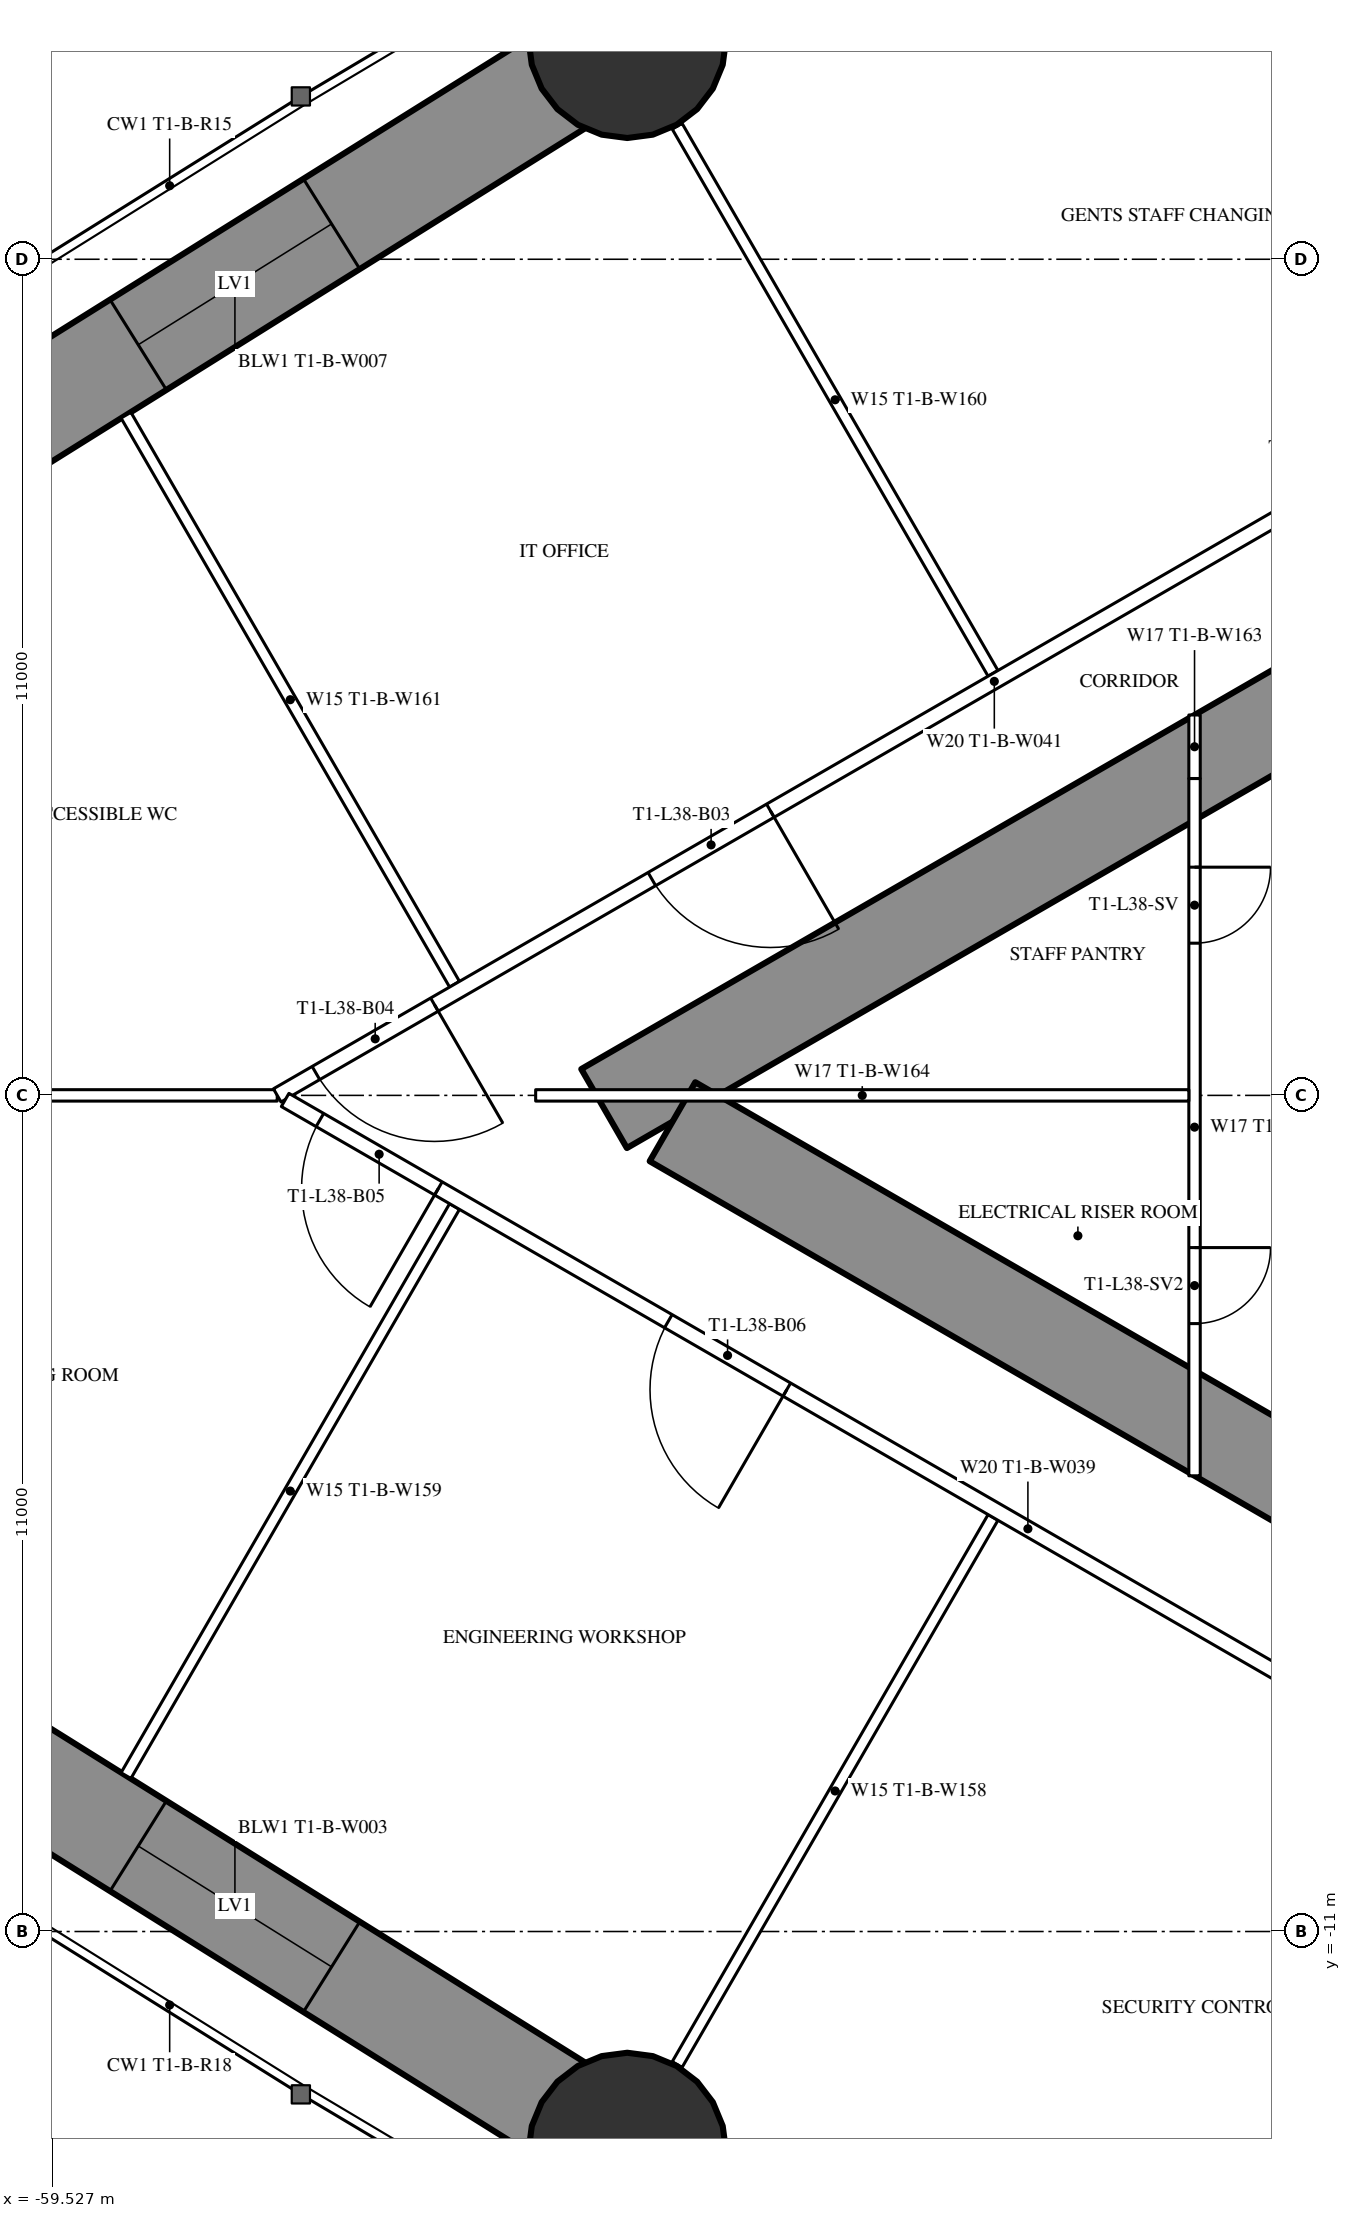
"""IFC4 building model, lengths in metres.
Left out: names, types, materials, properties, quantities, classifications, styles, units other than length and angle.
Written with IfcOpenShell. Run it as: python <this file> out.ifc"""

import sys

from ifc_helpers import new_model, si_unit, direction, frame, frame_2d, origin, origin_2d, place, context, subcontext, project, spatial, rectangle, hollow_circle, extrude, element, fill, save


model = new_model("IFC4")
c1 = context("Model", 3, precision=1e-05, world=origin(), true_north=direction((0.0, 1.0)))
c2 = subcontext(c1, "Body", "Model", "MODEL_VIEW")
j1 = project(units=[si_unit("LENGTHUNIT", "METRE"), si_unit("PLANEANGLEUNIT", "RADIAN")], contexts=[c1])
p1 = place(None, origin())
s1 = spatial("IfcSite", under=j1, at=p1, CompositionType="ELEMENT")
p2 = place(p1, origin())
s2 = spatial("IfcBuilding", under=s1, at=p2, CompositionType="ELEMENT")
p3 = place(p2, frame((0.0, 0.0, 143.1)))
s3 = spatial("IfcBuildingStorey", under=s2, at=p3, CompositionType="ELEMENT", Elevation=143.1)
for number, where, z_axis, x_axis in (
    (1, (-51.963, -13.895, 0.0), (0.0, 0.0, 1.0), (1.0, 0.0, 0.0)),
    (2, (-51.963, 13.895, 0.0), (0.0, 0.0, 1.0), (1.0, 0.0, 0.0)),
):
    element("IfcColumn", number, at=place(p3, frame(where, z_axis=z_axis, x_axis=x_axis)), inside=s3, PredefinedType="COLUMN", context=c2, shape_type="SweptSolid", body=[
        extrude(hollow_circle(Radius=1.3, WallThickness=0.1, at=origin_2d()), origin(), (0.0, 0.0, 1.0), 3.6),
    ])
p4 = place(p3, frame((-27.2, 14.3, 0.0), z_axis=(0.0, 0.0, 1.0), x_axis=(-0.866026593062, -0.499997940104, 0.0)))
e3 = element("IfcWall", 3, at=p4, inside=s3, PredefinedType="SHEAR", context=c2, shape_type="SweptSolid", body=[
    extrude(rectangle(XDim=28.946, YDim=1.2, at=frame_2d((14.473, 0.0))), origin(), (0.0, 0.0, 1.0), 3.6),
])
p5 = place(p4, frame((4.6, 0.0, 0.0)))
e4 = element("IfcOpeningElement", 4, at=p5, cuts=e3, PredefinedType="OPENING", context=c2, shape_type="SweptSolid", body=[
    extrude(rectangle(XDim=1.0, YDim=2.2, at=frame_2d((0.5, 1.1))), frame((0.0, 0.61, 0.0), z_axis=(0.0, -1.0, 0.0), x_axis=(1.0, 0.0, 0.0)), (0.0, 0.0, 1.0), 1.22),
])
p6 = place(p4, frame((14.545, 0.0, 0.0)))
e5 = element("IfcOpeningElement", 5, at=p6, cuts=e3, PredefinedType="OPENING", context=c2, shape_type="SweptSolid", body=[
    extrude(rectangle(XDim=1.8, YDim=2.2, at=frame_2d((0.9, 1.1))), frame((0.0, 0.61, 0.0), z_axis=(0.0, -1.0, 0.0), x_axis=(1.0, 0.0, 0.0)), (0.0, 0.0, 1.0), 1.22),
])
p7 = place(p3, frame((-27.2, -14.3, 0.0), z_axis=(0.0, 0.0, 1.0), x_axis=(-0.866024021859, 0.500002393557, 0.0)))
e6 = element("IfcWall", 6, at=p7, inside=s3, PredefinedType="SHEAR", context=c2, shape_type="SweptSolid", body=[
    extrude(rectangle(XDim=27.907, YDim=1.2, at=frame_2d((13.954, 0.0))), origin(), (0.0, 0.0, 1.0), 3.6),
])
p8 = place(p7, frame((4.6, 0.0, 0.0)))
e7 = element("IfcOpeningElement", 7, at=p8, cuts=e6, PredefinedType="OPENING", context=c2, shape_type="SweptSolid", body=[
    extrude(rectangle(XDim=1.0, YDim=2.2, at=frame_2d((0.5, 1.1))), frame((0.0, 0.61, 0.0), z_axis=(0.0, -1.0, 0.0), x_axis=(1.0, 0.0, 0.0)), (0.0, 0.0, 1.0), 1.22),
])
p9 = place(p7, frame((13.845, 0.0, 0.0)))
e8 = element("IfcOpeningElement", 8, at=p9, cuts=e6, PredefinedType="OPENING", context=c2, shape_type="SweptSolid", body=[
    extrude(rectangle(XDim=1.8, YDim=2.2, at=frame_2d((0.9, 1.1))), frame((0.0, 0.61, 0.0), z_axis=(0.0, -1.0, 0.0), x_axis=(1.0, 0.0, 0.0)), (0.0, 0.0, 1.0), 1.22),
])
p10 = place(p3, frame((-41.245, 19.666, 0.0), z_axis=(0.0, 0.0, 1.0), x_axis=(-0.880492350889, -0.474060354835, 0.0)))
e9 = element("IfcWall", 9, at=p10, inside=s3, PredefinedType="SHEAR", context=c2, shape_type="SweptSolid", body=[
    extrude(rectangle(XDim=12.173, YDim=1.4, at=frame_2d((6.086, 0.0))), origin(), (0.0, 0.0, 1.0), 3.6),
])
p11 = place(p10, frame((4.586, 0.0, 0.6)))
e10 = element("IfcOpeningElement", 10, at=p11, cuts=e9, PredefinedType="OPENING", context=c2, shape_type="SweptSolid", body=[
    extrude(rectangle(XDim=3.0, YDim=1.2, at=frame_2d((1.5, 0.6))), frame((0.0, 0.71, 0.0), z_axis=(0.0, -1.0, 0.0), x_axis=(1.0, 0.0, 0.0)), (0.0, 0.0, 1.0), 1.42),
])
p12 = place(p3, frame((-51.963, 13.895, 0.0), z_axis=(0.0, 0.0, 1.0), x_axis=(-0.848062521637, -0.529896177939, 0.0)))
e11 = element("IfcWall", 11, at=p12, inside=s3, PredefinedType="SHEAR", context=c2, shape_type="SweptSolid", body=[
    extrude(rectangle(XDim=12.173, YDim=1.4, at=frame_2d((6.086, 0.0))), origin(), (0.0, 0.0, 1.0), 3.6),
])
p13 = place(p12, frame((4.586, 0.0, 0.6)))
e12 = element("IfcOpeningElement", 12, at=p13, cuts=e11, PredefinedType="OPENING", context=c2, shape_type="SweptSolid", body=[
    extrude(rectangle(XDim=3.0, YDim=1.2, at=frame_2d((1.5, 0.6))), frame((0.0, 0.71, 0.0), z_axis=(0.0, -1.0, 0.0), x_axis=(1.0, 0.0, 0.0)), (0.0, 0.0, 1.0), 1.42),
])
p14 = place(p3, frame((-62.287, -7.445, 0.0), z_axis=(0.0, 0.0, 1.0), x_axis=(0.848062521637, -0.529896177939, 0.0)))
e13 = element("IfcWall", 13, at=p14, inside=s3, PredefinedType="SHEAR", context=c2, shape_type="SweptSolid", body=[
    extrude(rectangle(XDim=12.173, YDim=1.4, at=frame_2d((6.086, 0.0))), origin(), (0.0, 0.0, 1.0), 3.6),
])
p15 = place(p14, frame((4.586, 0.0, 0.6)))
e14 = element("IfcOpeningElement", 14, at=p15, cuts=e13, PredefinedType="OPENING", context=c2, shape_type="SweptSolid", body=[
    extrude(rectangle(XDim=3.0, YDim=1.2, at=frame_2d((1.5, 0.6))), frame((0.0, 0.71, 0.0), z_axis=(0.0, -1.0, 0.0), x_axis=(1.0, 0.0, 0.0)), (0.0, 0.0, 1.0), 1.42),
])
p16 = place(p3, frame((-51.963, -13.895, 0.0), z_axis=(0.0, 0.0, 1.0), x_axis=(0.880492350889, -0.474060354835, 0.0)))
e15 = element("IfcWall", 15, at=p16, inside=s3, PredefinedType="SHEAR", context=c2, shape_type="SweptSolid", body=[
    extrude(rectangle(XDim=12.173, YDim=1.4, at=frame_2d((6.086, 0.0))), origin(), (0.0, 0.0, 1.0), 3.6),
])
p17 = place(p16, frame((4.586, 0.0, 0.6)))
e16 = element("IfcOpeningElement", 16, at=p17, cuts=e15, PredefinedType="OPENING", context=c2, shape_type="SweptSolid", body=[
    extrude(rectangle(XDim=3.0, YDim=1.2, at=frame_2d((1.5, 0.6))), frame((0.0, 0.71, 0.0), z_axis=(0.0, -1.0, 0.0), x_axis=(1.0, 0.0, 0.0)), (0.0, 0.0, 1.0), 1.42),
])
p18 = place(p3, frame((-47.151, 5.552, 0.0), z_axis=(0.0, 0.0, 1.0), x_axis=(-0.500003012045, 0.866023664773, 0.0)))
e17 = element("IfcWall", 17, at=p18, inside=s3, PredefinedType="PARTITIONING", context=c2, shape_type="SweptSolid", body=[
    extrude(rectangle(XDim=8.311, YDim=0.15, at=frame_2d((4.156, 0.0))), origin(), (0.0, 0.0, 1.0), 2.15),
])
p19 = place(p3, frame((-54.236, 1.462, 0.0), z_axis=(0.0, 0.0, 1.0), x_axis=(-0.499999505331, 0.866025689381, 0.0)))
e18 = element("IfcWall", 18, at=p19, inside=s3, PredefinedType="PARTITIONING", context=c2, shape_type="SweptSolid", body=[
    extrude(rectangle(XDim=8.645, YDim=0.15, at=frame_2d((4.323, 0.0))), origin(), (0.0, 0.0, 1.0), 3.35),
])
p20 = place(p3, frame((-47.151, -5.552, 0.0), z_axis=(0.0, 0.0, 1.0), x_axis=(-0.500003012045, -0.866023664773, 0.0)))
e19 = element("IfcWall", 19, at=p20, inside=s3, PredefinedType="PARTITIONING", context=c2, shape_type="SweptSolid", body=[
    extrude(rectangle(XDim=8.311, YDim=0.15, at=frame_2d((4.156, 0.0))), origin(), (0.0, 0.0, 1.0), 2.15),
])
p21 = place(p3, frame((-54.236, -1.462, 0.0), z_axis=(0.0, 0.0, 1.0), x_axis=(-0.499999505331, -0.866025689381, 0.0)))
e20 = element("IfcWall", 20, at=p21, inside=s3, PredefinedType="PARTITIONING", context=c2, shape_type="SweptSolid", body=[
    extrude(rectangle(XDim=8.645, YDim=0.15, at=frame_2d((4.323, 0.0))), origin(), (0.0, 0.0, 1.0), 3.35),
])
p22 = place(p3, frame((-56.568, 0.0, 0.0), z_axis=(0.0, 0.0, 1.0), x_axis=(-1.0, 0.0, 0.0)))
e21 = element("IfcWall", 21, at=p22, inside=s3, PredefinedType="PARTITIONING", context=c2, shape_type="SweptSolid", body=[
    extrude(rectangle(XDim=11.663, YDim=0.15, at=frame_2d((5.832, 0.0))), origin(), (0.0, 0.0, 1.0), 2.15),
])
p23 = place(p3, frame((-37.7, 10.894, 0.0), z_axis=(0.0, 0.0, 1.0), x_axis=(-0.866027905338, -0.499995667157, 0.0)))
e22 = element("IfcWall", 22, at=p23, inside=s3, PredefinedType="PARTITIONING", context=c2, shape_type="SweptSolid", body=[
    extrude(rectangle(XDim=21.787, YDim=0.2, at=frame_2d((10.894, 0.0))), origin(), (0.0, 0.0, 1.0), 3.35),
])
p24 = place(p23, frame((14.296, 0.0, 0.0)))
e23 = element("IfcOpeningElement", 23, at=p24, cuts=e22, PredefinedType="OPENING", context=c2, shape_type="SweptSolid", body=[
    extrude(rectangle(XDim=1.8, YDim=2.2, at=frame_2d((0.9, 1.1))), frame((0.0, 0.11, 0.0), z_axis=(0.0, -1.0, 0.0), x_axis=(1.0, 0.0, 0.0)), (0.0, 0.0, 1.0), 0.22),
])
p25 = place(p23, frame((19.399, 0.0, 0.0)))
e24 = element("IfcOpeningElement", 24, at=p25, cuts=e22, PredefinedType="OPENING", context=c2, shape_type="SweptSolid", body=[
    extrude(rectangle(XDim=1.8, YDim=2.14, at=frame_2d((0.9, 1.07))), frame((0.0, 0.11, 0.0), z_axis=(0.0, -1.0, 0.0), x_axis=(1.0, 0.0, 0.0)), (0.0, 0.0, 1.0), 0.22),
])
p26 = place(p23, frame((4.64, 0.0, 0.0)))
e25 = element("IfcOpeningElement", 25, at=p26, cuts=e22, PredefinedType="OPENING", context=c2, shape_type="SweptSolid", body=[
    extrude(rectangle(XDim=1.8, YDim=2.2, at=frame_2d((0.9, 1.1))), frame((0.0, 0.11, 0.0), z_axis=(0.0, -1.0, 0.0), x_axis=(1.0, 0.0, 0.0)), (0.0, 0.0, 1.0), 0.22),
])
p27 = place(p3, frame((-36.92, -11.344, 0.0), z_axis=(0.0, 0.0, 1.0), x_axis=(-0.866028313256, 0.499994960614, 0.0)))
e26 = element("IfcWall", 26, at=p27, inside=s3, PredefinedType="PARTITIONING", context=c2, shape_type="SweptSolid", body=[
    extrude(rectangle(XDim=22.568, YDim=0.2, at=frame_2d((11.284, 0.0))), origin(), (0.0, 0.0, 1.0), 3.35),
])
p28 = place(p27, frame((20.24, 0.0, 0.0)))
e27 = element("IfcOpeningElement", 27, at=p28, cuts=e26, PredefinedType="OPENING", context=c2, shape_type="SweptSolid", body=[
    extrude(rectangle(XDim=1.8, YDim=2.14, at=frame_2d((0.9, 1.07))), frame((0.0, 0.11, 0.0), z_axis=(0.0, -1.0, 0.0), x_axis=(1.0, 0.0, 0.0)), (0.0, 0.0, 1.0), 0.22),
])
p29 = place(p27, frame((14.946, 0.0, 0.0)))
e28 = element("IfcOpeningElement", 28, at=p29, cuts=e26, PredefinedType="OPENING", context=c2, shape_type="SweptSolid", body=[
    extrude(rectangle(XDim=1.8, YDim=2.2, at=frame_2d((0.9, 1.1))), frame((0.0, 0.11, 0.0), z_axis=(0.0, -1.0, 0.0), x_axis=(1.0, 0.0, 0.0)), (0.0, 0.0, 1.0), 0.22),
])
p30 = place(p27, frame((5.091, 0.0, 0.0)))
e29 = element("IfcOpeningElement", 29, at=p30, cuts=e26, PredefinedType="OPENING", context=c2, shape_type="SweptSolid", body=[
    extrude(rectangle(XDim=1.8, YDim=2.2, at=frame_2d((0.9, 1.1))), frame((0.0, 0.11, 0.0), z_axis=(0.0, -1.0, 0.0), x_axis=(1.0, 0.0, 0.0)), (0.0, 0.0, 1.0), 0.22),
])
p31 = place(p3, frame((-44.5, 4.169, 0.0), z_axis=(0.0, 0.0, 1.0), x_axis=(0.0, -1.0, 0.0)))
e30 = element("IfcWall", 30, at=p31, inside=s3, PredefinedType="PARTITIONING", context=c2, shape_type="SweptSolid", body=[
    extrude(rectangle(XDim=9.173, YDim=0.15, at=frame_2d((4.587, 0.0))), origin(), (0.0, 0.0, 1.0), 3.35),
])
p32 = place(p31, frame((1.167, 0.0, 0.0)))
e31 = element("IfcOpeningElement", 31, at=p32, cuts=e30, PredefinedType="OPENING", context=c2, shape_type="SweptSolid", body=[
    extrude(rectangle(XDim=1.0, YDim=2.2, at=frame_2d((0.5, 1.1))), frame((0.0, 0.085, 0.0), z_axis=(0.0, -1.0, 0.0), x_axis=(1.0, 0.0, 0.0)), (0.0, 0.0, 1.0), 0.17),
])
p33 = place(p31, frame((6.171, 0.0, 0.0)))
e32 = element("IfcOpeningElement", 32, at=p33, cuts=e30, PredefinedType="OPENING", context=c2, shape_type="SweptSolid", body=[
    extrude(rectangle(XDim=1.0, YDim=2.2, at=frame_2d((0.5, 1.1))), frame((0.0, 0.085, 0.0), z_axis=(0.0, -1.0, 0.0), x_axis=(1.0, 0.0, 0.0)), (0.0, 0.0, 1.0), 0.17),
])
p34 = place(p3, frame((-44.575, 0.0, 0.0), z_axis=(0.0, 0.0, 1.0), x_axis=(-1.0, 0.0, 0.0)))
e33 = element("IfcWall", 33, at=p34, inside=s3, PredefinedType="PARTITIONING", context=c2, shape_type="SweptSolid", body=[
    extrude(rectangle(XDim=8.593, YDim=0.15, at=frame_2d((4.297, 0.0))), origin(), (0.0, 0.0, 1.0), 2.15),
])
p35 = place(p3, frame((-44.5, 5.005, 0.0), z_axis=(0.0, 0.0, 1.0), x_axis=(0.0, -1.0, 0.0)))
e34 = element("IfcWall", 34, at=p35, inside=s3, PredefinedType="PARTITIONING", context=c2, shape_type="SweptSolid", body=[
    extrude(rectangle(XDim=0.836, YDim=0.15, at=frame_2d((0.418, 0.0))), origin(), (0.0, 0.0, 1.0), 2.15),
])
p36 = place(p13, origin())
e35 = element("IfcWindow", 35, at=p36, inside=s3, PartitioningType="SINGLE_PANEL", PredefinedType="WINDOW", context=c2, shape_type="SweptSolid", body=[
    extrude(rectangle(XDim=3.0, YDim=1.2, at=frame_2d((1.5, 0.6))), frame((0.0, 0.03, 0.0), z_axis=(0.0, -1.0, 0.0), x_axis=(1.0, 0.0, 0.0)), (0.0, 0.0, 1.0), 0.06),
])
fill(e12, e35)
p37 = place(p15, origin())
e36 = element("IfcWindow", 36, at=p37, inside=s3, PartitioningType="SINGLE_PANEL", PredefinedType="WINDOW", context=c2, shape_type="SweptSolid", body=[
    extrude(rectangle(XDim=3.0, YDim=1.2, at=frame_2d((1.5, 0.6))), frame((0.0, 0.03, 0.0), z_axis=(0.0, -1.0, 0.0), x_axis=(1.0, 0.0, 0.0)), (0.0, 0.0, 1.0), 0.06),
])
fill(e14, e36)
p38 = place(p24, origin())
e37 = element("IfcDoor", 37, at=p38, inside=s3, OperationType="DOUBLE_DOOR_SINGLE_SWING", PredefinedType="DOOR", context=c2, shape_type="SweptSolid", body=[
    extrude(rectangle(XDim=1.8, YDim=2.2, at=frame_2d((0.9, 1.1))), frame((0.0, 0.025, 0.0), z_axis=(0.0, -1.0, 0.0), x_axis=(1.0, 0.0, 0.0)), (0.0, 0.0, 1.0), 0.05),
])
fill(e23, e37)
p39 = place(p25, origin())
e38 = element("IfcDoor", 38, at=p39, inside=s3, OperationType="DOUBLE_DOOR_SINGLE_SWING", PredefinedType="DOOR", context=c2, shape_type="SweptSolid", body=[
    extrude(rectangle(XDim=1.8, YDim=2.14, at=frame_2d((0.9, 1.07))), frame((0.0, 0.025, 0.0), z_axis=(0.0, -1.0, 0.0), x_axis=(1.0, 0.0, 0.0)), (0.0, 0.0, 1.0), 0.05),
])
fill(e24, e38)
p40 = place(p28, origin())
e39 = element("IfcDoor", 39, at=p40, inside=s3, OperationType="DOUBLE_DOOR_SINGLE_SWING", PredefinedType="DOOR", context=c2, shape_type="SweptSolid", body=[
    extrude(rectangle(XDim=1.8, YDim=2.14, at=frame_2d((0.9, 1.07))), frame((0.0, 0.025, 0.0), z_axis=(0.0, -1.0, 0.0), x_axis=(1.0, 0.0, 0.0)), (0.0, 0.0, 1.0), 0.05),
])
fill(e27, e39)
p41 = place(p29, origin())
e40 = element("IfcDoor", 40, at=p41, inside=s3, OperationType="DOUBLE_DOOR_SINGLE_SWING", PredefinedType="DOOR", context=c2, shape_type="SweptSolid", body=[
    extrude(rectangle(XDim=1.8, YDim=2.2, at=frame_2d((0.9, 1.1))), frame((0.0, 0.025, 0.0), z_axis=(0.0, -1.0, 0.0), x_axis=(1.0, 0.0, 0.0)), (0.0, 0.0, 1.0), 0.05),
])
fill(e28, e40)
p42 = place(p32, origin())
e41 = element("IfcDoor", 41, at=p42, inside=s3, OperationType="SINGLE_SWING_LEFT", PredefinedType="DOOR", context=c2, shape_type="SweptSolid", body=[
    extrude(rectangle(XDim=1.0, YDim=2.2, at=frame_2d((0.5, 1.1))), frame((0.0, 0.025, 0.0), z_axis=(0.0, -1.0, 0.0), x_axis=(1.0, 0.0, 0.0)), (0.0, 0.0, 1.0), 0.05),
])
fill(e31, e41)
p43 = place(p33, origin())
e42 = element("IfcDoor", 42, at=p43, inside=s3, OperationType="SINGLE_SWING_LEFT", PredefinedType="DOOR", context=c2, shape_type="SweptSolid", body=[
    extrude(rectangle(XDim=1.0, YDim=2.2, at=frame_2d((0.5, 1.1))), frame((0.0, 0.025, 0.0), z_axis=(0.0, -1.0, 0.0), x_axis=(1.0, 0.0, 0.0)), (0.0, 0.0, 1.0), 0.05),
])
fill(e32, e42)
save(model, sys.argv[1])
